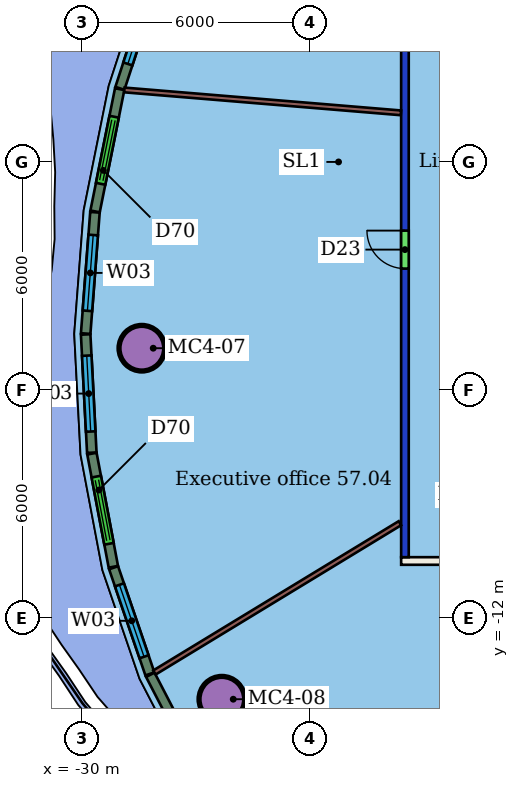
"""IFC4 building model, lengths in metres.
Left out: names, types, materials, properties, quantities, classifications, styles, units other than length and angle.
Written with IfcOpenShell. Run it as: python <this file> out.ifc"""

import sys

from ifc_helpers import new_model, si_unit, direction, frame, frame_2d, origin, origin_2d, place, context, subcontext, project, spatial, rectangle, hollow_circle, extrude, element, fill, save


model = new_model("IFC4")
c1 = context("Model", 3, precision=1e-05, world=origin(), true_north=direction((0.0, 1.0)))
c2 = subcontext(c1, "Body", "Model", "MODEL_VIEW")
j1 = project(units=[si_unit("LENGTHUNIT", "METRE"), si_unit("PLANEANGLEUNIT", "RADIAN")], contexts=[c1])
p1 = place(None, origin())
s1 = spatial("IfcSite", under=j1, at=p1, CompositionType="ELEMENT")
p2 = place(p1, origin())
s2 = spatial("IfcBuilding", under=s1, at=p2, CompositionType="ELEMENT")
p3 = place(p2, frame((0.0, 0.0, 231.7)))
s3 = spatial("IfcBuildingStorey", under=s2, at=p3, CompositionType="ELEMENT", Elevation=231.7)
for number, where, z_axis, x_axis in (
    (1, (-28.424, -4.901, 0.0), (0.0, 0.0, 1.0), (1.0, 0.0, 0.0)),
    (2, (-26.318, -14.137, 0.0), (0.0, 0.0, 1.0), (1.0, 0.0, 0.0)),
):
    element("IfcColumn", number, at=place(p3, frame(where, z_axis=z_axis, x_axis=x_axis)), inside=s3, PredefinedType="COLUMN", context=c2, shape_type="SweptSolid", body=[
        extrude(hollow_circle(Radius=0.6, WallThickness=0.045, at=origin_2d()), origin(), (0.0, 0.0, 1.0), 3.45),
    ])
p4 = place(p3, frame((9.6, -10.5, 0.0), z_axis=(0.0, 0.0, 1.0), x_axis=(-1.0, 0.0, 0.0)))
e3 = element("IfcWall", 3, at=p4, inside=s3, PredefinedType="PARTITIONING", context=c2, shape_type="SweptSolid", body=[
    extrude(rectangle(XDim=31.2, YDim=0.2, at=frame_2d((15.6, 0.0))), origin(), (0.0, 0.0, 1.0), 3.45),
])
p5 = place(p4, frame((26.389, 0.0, 0.0)))
e4 = element("IfcOpeningElement", 4, at=p5, cuts=e3, PredefinedType="OPENING", context=c2, shape_type="SweptSolid", body=[
    extrude(rectangle(XDim=1.0, YDim=2.4, at=frame_2d((0.5, 1.2))), frame((0.0, 0.11, 0.0), z_axis=(0.0, -1.0, 0.0), x_axis=(1.0, 0.0, 0.0)), (0.0, 0.0, 1.0), 0.22),
])
p6 = place(p4, frame((19.969, 0.0, 0.0)))
e5 = element("IfcOpeningElement", 5, at=p6, cuts=e3, PredefinedType="OPENING", context=c2, shape_type="SweptSolid", body=[
    extrude(rectangle(XDim=1.5, YDim=2.1, at=frame_2d((0.75, 1.05))), frame((0.0, 0.11, 0.0), z_axis=(0.0, -1.0, 0.0), x_axis=(1.0, 0.0, 0.0)), (0.0, 0.0, 1.0), 0.22),
])
p7 = place(p4, frame((16.344, 0.0, 0.0)))
e6 = element("IfcOpeningElement", 6, at=p7, cuts=e3, PredefinedType="OPENING", context=c2, shape_type="SweptSolid", body=[
    extrude(rectangle(XDim=1.0, YDim=2.4, at=frame_2d((0.5, 1.2))), frame((0.0, 0.11, 0.0), z_axis=(0.0, -1.0, 0.0), x_axis=(1.0, 0.0, 0.0)), (0.0, 0.0, 1.0), 0.22),
])
p8 = place(p4, frame((10.549, 0.0, 0.0)))
e7 = element("IfcOpeningElement", 7, at=p8, cuts=e3, PredefinedType="OPENING", context=c2, shape_type="SweptSolid", body=[
    extrude(rectangle(XDim=0.9, YDim=2.1, at=frame_2d((0.45, 1.05))), frame((0.0, 0.11, 0.0), z_axis=(0.0, -1.0, 0.0), x_axis=(1.0, 0.0, 0.0)), (0.0, 0.0, 1.0), 0.22),
])
p9 = place(p4, frame((6.228, 0.0, 0.0)))
e8 = element("IfcOpeningElement", 8, at=p9, cuts=e3, PredefinedType="OPENING", context=c2, shape_type="SweptSolid", body=[
    extrude(rectangle(XDim=1.2, YDim=2.4, at=frame_2d((0.6, 1.2))), frame((0.0, 0.11, 0.0), z_axis=(0.0, -1.0, 0.0), x_axis=(1.0, 0.0, 0.0)), (0.0, 0.0, 1.0), 0.22),
])
p10 = place(p3, frame((-21.5, -10.4, 0.0), z_axis=(0.0, 0.0, 1.0), x_axis=(0.0, 1.0, 0.0)))
e9 = element("IfcWall", 9, at=p10, inside=s3, PredefinedType="PARTITIONING", context=c2, shape_type="SweptSolid", body=[
    extrude(rectangle(XDim=20.8, YDim=0.2, at=frame_2d((10.4, 0.0))), origin(), (0.0, 0.0, 1.0), 3.05),
])
p11 = place(p10, frame((14.304, 0.0, 0.0)))
e10 = element("IfcOpeningElement", 10, at=p11, cuts=e9, PredefinedType="OPENING", context=c2, shape_type="SweptSolid", body=[
    extrude(rectangle(XDim=1.0, YDim=2.4, at=frame_2d((0.5, 1.2))), frame((0.0, 0.11, 0.0), z_axis=(0.0, -1.0, 0.0), x_axis=(1.0, 0.0, 0.0)), (0.0, 0.0, 1.0), 0.22),
])
p12 = place(p10, frame((7.593, 0.0, 0.0)))
e11 = element("IfcOpeningElement", 11, at=p12, cuts=e9, PredefinedType="OPENING", context=c2, shape_type="SweptSolid", body=[
    extrude(rectangle(XDim=1.0, YDim=2.4, at=frame_2d((0.5, 1.2))), frame((0.0, 0.11, 0.0), z_axis=(0.0, -1.0, 0.0), x_axis=(1.0, 0.0, 0.0)), (0.0, 0.0, 1.0), 0.22),
])
p13 = place(p3, frame((-28.884, 1.894, 0.0), z_axis=(0.0, 0.0, 1.0), x_axis=(0.996590797754, -0.08250322316, 0.0)))
e12 = element("IfcWall", 12, at=p13, inside=s3, PredefinedType="PARTITIONING", context=c2, shape_type="SweptSolid", body=[
    extrude(rectangle(XDim=7.303, YDim=0.125, at=frame_2d((3.652, 0.0))), origin(), (0.0, 0.0, 1.0), 3.45),
])
p14 = place(p3, frame((-28.092, -13.434, 0.0), z_axis=(0.0, 0.0, 1.0), x_axis=(0.854426088505, 0.519572958574, 0.0)))
e13 = element("IfcWall", 13, at=p14, inside=s3, PredefinedType="PARTITIONING", context=c2, shape_type="SweptSolid", body=[
    extrude(rectangle(XDim=7.56, YDim=0.125, at=frame_2d((3.78, 0.0))), origin(), (0.0, 0.0, 1.0), 3.45),
])
p15 = place(p3, frame((-23.067, -20.282, 0.0), z_axis=(0.0, 0.0, 1.0), x_axis=(0.643851122285, 0.765150790585, 0.0)))
e14 = element("IfcWall", 14, at=p15, inside=s3, PredefinedType="PARTITIONING", context=c2, shape_type="SweptSolid", body=[
    extrude(rectangle(XDim=12.602, YDim=0.125, at=frame_2d((6.301, 0.0))), origin(), (0.0, 0.0, 1.0), 3.45),
])
p16 = place(p3, frame((-27.961, 5.122, 0.0), z_axis=(0.0, 0.0, 1.0), x_axis=(-0.310298321168, -0.950639233295, 0.0)))
e15 = element("IfcWall", 15, at=p16, inside=s3, PredefinedType="SOLIDWALL", context=c2, shape_type="SweptSolid", body=[
    extrude(rectangle(XDim=3.351, YDim=0.25, at=frame_2d((1.676, 0.0))), origin(), (0.0, 0.0, 1.0), 3.1),
])
p17 = place(p16, frame((0.676, 0.0, 0.9)))
e16 = element("IfcOpeningElement", 16, at=p17, cuts=e15, PredefinedType="OPENING", context=c2, shape_type="SweptSolid", body=[
    extrude(rectangle(XDim=2.0, YDim=2.1, at=frame_2d((1.0, 1.05))), frame((0.0, 0.135, 0.0), z_axis=(0.0, -1.0, 0.0), x_axis=(1.0, 0.0, 0.0)), (0.0, 0.0, 1.0), 0.27),
])
p18 = place(p3, frame((-29.007, 1.915, 0.0), z_axis=(0.0, 0.0, 1.0), x_axis=(-0.197275160693, -0.980348158041, 0.0)))
e17 = element("IfcWall", 17, at=p18, inside=s3, PredefinedType="SOLIDWALL", context=c2, shape_type="SweptSolid", body=[
    extrude(rectangle(XDim=3.281, YDim=0.25, at=frame_2d((1.64, 0.0))), origin(), (0.0, 0.0, 1.0), 3.1),
])
p19 = place(p18, frame((0.74, 0.0, 0.0)))
e18 = element("IfcOpeningElement", 18, at=p19, cuts=e17, PredefinedType="OPENING", context=c2, shape_type="SweptSolid", body=[
    extrude(rectangle(XDim=1.8, YDim=2.4, at=frame_2d((0.9, 1.2))), frame((0.0, 0.135, 0.0), z_axis=(0.0, -1.0, 0.0), x_axis=(1.0, 0.0, 0.0)), (0.0, 0.0, 1.0), 0.27),
])
p20 = place(p3, frame((-29.657, -1.324, 0.0), z_axis=(0.0, 0.0, 1.0), x_axis=(-0.076358161895, -0.997080453681, 0.0)))
e19 = element("IfcWall", 19, at=p20, inside=s3, PredefinedType="SOLIDWALL", context=c2, shape_type="SweptSolid", body=[
    extrude(rectangle(XDim=3.2, YDim=0.25, at=frame_2d((1.6, 0.0))), origin(), (0.0, 0.0, 1.0), 3.1),
])
p21 = place(p20, frame((0.6, 0.0, 0.9)))
e20 = element("IfcOpeningElement", 20, at=p21, cuts=e19, PredefinedType="OPENING", context=c2, shape_type="SweptSolid", body=[
    extrude(rectangle(XDim=2.0, YDim=2.1, at=frame_2d((1.0, 1.05))), frame((0.0, 0.135, 0.0), z_axis=(0.0, -1.0, 0.0), x_axis=(1.0, 0.0, 0.0)), (0.0, 0.0, 1.0), 0.27),
])
p22 = place(p3, frame((-29.902, -4.54, 0.0), z_axis=(0.0, 0.0, 1.0), x_axis=(0.051884190685, -0.99865310832, 0.0)))
e21 = element("IfcWall", 21, at=p22, inside=s3, PredefinedType="SOLIDWALL", context=c2, shape_type="SweptSolid", body=[
    extrude(rectangle(XDim=3.115, YDim=0.25, at=frame_2d((1.558, 0.0))), origin(), (0.0, 0.0, 1.0), 3.1),
])
p23 = place(p22, frame((0.558, 0.0, 0.9)))
e22 = element("IfcOpeningElement", 22, at=p23, cuts=e21, PredefinedType="OPENING", context=c2, shape_type="SweptSolid", body=[
    extrude(rectangle(XDim=2.0, YDim=2.1, at=frame_2d((1.0, 1.05))), frame((0.0, 0.135, 0.0), z_axis=(0.0, -1.0, 0.0), x_axis=(1.0, 0.0, 0.0)), (0.0, 0.0, 1.0), 0.27),
])
p24 = place(p3, frame((-29.737, -7.675, 0.0), z_axis=(0.0, 0.0, 1.0), x_axis=(0.186112401934, -0.982528459561, 0.0)))
e23 = element("IfcWall", 23, at=p24, inside=s3, PredefinedType="SOLIDWALL", context=c2, shape_type="SweptSolid", body=[
    extrude(rectangle(XDim=3.03, YDim=0.25, at=frame_2d((1.515, 0.0))), origin(), (0.0, 0.0, 1.0), 3.1),
])
p25 = place(p24, frame((0.615, 0.0, 0.0)))
e24 = element("IfcOpeningElement", 24, at=p25, cuts=e23, PredefinedType="OPENING", context=c2, shape_type="SweptSolid", body=[
    extrude(rectangle(XDim=1.8, YDim=2.4, at=frame_2d((0.9, 1.2))), frame((0.0, 0.135, 0.0), z_axis=(0.0, -1.0, 0.0), x_axis=(1.0, 0.0, 0.0)), (0.0, 0.0, 1.0), 0.27),
])
p26 = place(p3, frame((-29.167, -10.677, 0.0), z_axis=(0.0, 0.0, 1.0), x_axis=(0.32363701793, -0.946181314879, 0.0)))
e25 = element("IfcWall", 25, at=p26, inside=s3, PredefinedType="SOLIDWALL", context=c2, shape_type="SweptSolid", body=[
    extrude(rectangle(XDim=2.952, YDim=0.25, at=frame_2d((1.476, 0.0))), origin(), (0.0, 0.0, 1.0), 3.1),
])
p27 = place(p26, frame((0.476, 0.0, 0.9)))
e26 = element("IfcOpeningElement", 26, at=p27, cuts=e25, PredefinedType="OPENING", context=c2, shape_type="SweptSolid", body=[
    extrude(rectangle(XDim=2.0, YDim=2.1, at=frame_2d((1.0, 1.05))), frame((0.0, 0.135, 0.0), z_axis=(0.0, -1.0, 0.0), x_axis=(1.0, 0.0, 0.0)), (0.0, 0.0, 1.0), 0.27),
])
p28 = place(p3, frame((-28.201, -13.495, 0.0), z_axis=(0.0, 0.0, 1.0), x_axis=(0.460447402604, -0.887686988434, 0.0)))
e27 = element("IfcWall", 27, at=p28, inside=s3, PredefinedType="SOLIDWALL", context=c2, shape_type="SweptSolid", body=[
    extrude(rectangle(XDim=2.845, YDim=0.25, at=frame_2d((1.423, 0.0))), origin(), (0.0, 0.0, 1.0), 3.1),
])
p29 = place(p12, origin())
e28 = element("IfcDoor", 28, at=p29, inside=s3, OperationType="SINGLE_SWING_RIGHT", PredefinedType="DOOR", context=c2, shape_type="SweptSolid", body=[
    extrude(rectangle(XDim=1.0, YDim=2.4, at=frame_2d((0.5, 1.2))), frame((0.0, 0.025, 0.0), z_axis=(0.0, -1.0, 0.0), x_axis=(1.0, 0.0, 0.0)), (0.0, 0.0, 1.0), 0.05),
])
fill(e11, e28)
p30 = place(p17, origin())
e29 = element("IfcWindow", 29, at=p30, inside=s3, PartitioningType="SINGLE_PANEL", PredefinedType="WINDOW", context=c2, shape_type="SweptSolid", body=[
    extrude(rectangle(XDim=2.0, YDim=2.1, at=frame_2d((1.0, 1.05))), frame((0.0, 0.03, 0.0), z_axis=(0.0, -1.0, 0.0), x_axis=(1.0, 0.0, 0.0)), (0.0, 0.0, 1.0), 0.06),
])
fill(e16, e29)
p31 = place(p19, origin())
e30 = element("IfcDoor", 30, at=p31, inside=s3, OperationType="DOUBLE_DOOR_SLIDING", PredefinedType="DOOR", context=c2, shape_type="SweptSolid", body=[
    extrude(rectangle(XDim=1.8, YDim=2.4, at=frame_2d((0.9, 1.2))), frame((0.0, 0.025, 0.0), z_axis=(0.0, -1.0, 0.0), x_axis=(1.0, 0.0, 0.0)), (0.0, 0.0, 1.0), 0.05),
])
fill(e18, e30)
p32 = place(p21, origin())
e31 = element("IfcWindow", 31, at=p32, inside=s3, PartitioningType="SINGLE_PANEL", PredefinedType="WINDOW", context=c2, shape_type="SweptSolid", body=[
    extrude(rectangle(XDim=2.0, YDim=2.1, at=frame_2d((1.0, 1.05))), frame((0.0, 0.03, 0.0), z_axis=(0.0, -1.0, 0.0), x_axis=(1.0, 0.0, 0.0)), (0.0, 0.0, 1.0), 0.06),
])
fill(e20, e31)
p33 = place(p23, origin())
e32 = element("IfcWindow", 32, at=p33, inside=s3, PartitioningType="SINGLE_PANEL", PredefinedType="WINDOW", context=c2, shape_type="SweptSolid", body=[
    extrude(rectangle(XDim=2.0, YDim=2.1, at=frame_2d((1.0, 1.05))), frame((0.0, 0.03, 0.0), z_axis=(0.0, -1.0, 0.0), x_axis=(1.0, 0.0, 0.0)), (0.0, 0.0, 1.0), 0.06),
])
fill(e22, e32)
p34 = place(p25, origin())
e33 = element("IfcDoor", 33, at=p34, inside=s3, OperationType="DOUBLE_DOOR_SLIDING", PredefinedType="DOOR", context=c2, shape_type="SweptSolid", body=[
    extrude(rectangle(XDim=1.8, YDim=2.4, at=frame_2d((0.9, 1.2))), frame((0.0, 0.025, 0.0), z_axis=(0.0, -1.0, 0.0), x_axis=(1.0, 0.0, 0.0)), (0.0, 0.0, 1.0), 0.05),
])
fill(e24, e33)
p35 = place(p27, origin())
e34 = element("IfcWindow", 34, at=p35, inside=s3, PartitioningType="SINGLE_PANEL", PredefinedType="WINDOW", context=c2, shape_type="SweptSolid", body=[
    extrude(rectangle(XDim=2.0, YDim=2.1, at=frame_2d((1.0, 1.05))), frame((0.0, 0.03, 0.0), z_axis=(0.0, -1.0, 0.0), x_axis=(1.0, 0.0, 0.0)), (0.0, 0.0, 1.0), 0.06),
])
fill(e26, e34)
save(model, sys.argv[1])
